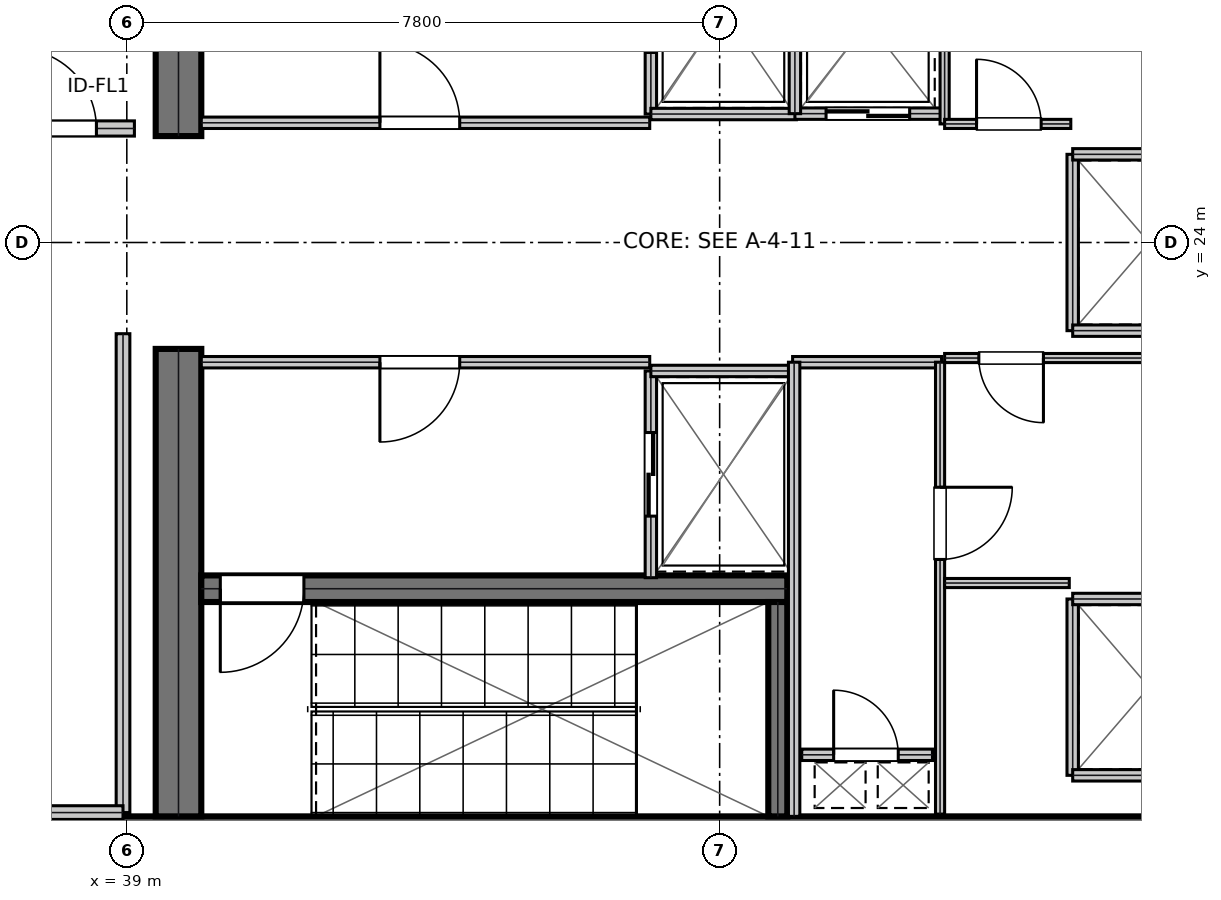
"""IFC4 building model, lengths in metres.
Left out: names, types, materials, properties, quantities, classifications, styles, units other than length and angle.
Written with IfcOpenShell. Run it as: python <this file> out.ifc"""

import sys

from ifc_helpers import new_model, si_unit, direction, frame, frame_2d, origin, place, context, subcontext, project, spatial, rectangle, extrude, element, fill, save


model = new_model("IFC4")
c1 = context("Model", 3, precision=1e-05, world=origin(), true_north=direction((0.0, 1.0)))
c2 = subcontext(c1, "Body", "Model", "MODEL_VIEW")
j1 = project(units=[si_unit("LENGTHUNIT", "METRE"), si_unit("PLANEANGLEUNIT", "RADIAN")], contexts=[c1])
p1 = place(None, origin())
s1 = spatial("IfcSite", under=j1, at=p1, CompositionType="ELEMENT")
p2 = place(p1, origin())
s2 = spatial("IfcBuilding", under=s1, at=p2, CompositionType="ELEMENT")
p3 = place(p2, frame((0.0, 0.0, 256.65)))
s3 = spatial("IfcBuildingStorey", under=s2, at=p3, CompositionType="ELEMENT", Elevation=256.65)
p4 = place(p3, frame((38.8, 16.15, 0.0), z_axis=(0.0, 0.0, 1.0), x_axis=(1.0, 0.0, 0.0)))
e1 = element("IfcWall", 1, at=p4, inside=s3, PredefinedType="SHEAR", context=c2, shape_type="SweptSolid", body=[
    extrude(rectangle(XDim=16.0, YDim=0.6, at=frame_2d((8.0, 0.0))), origin(), (0.0, 0.0, 1.0), 5.12),
])
p5 = place(p3, frame((39.68, 16.45, 0.0), z_axis=(0.0, 0.0, 1.0), x_axis=(0.0, 1.0, 0.0)))
e2 = element("IfcWall", 2, at=p5, inside=s3, PredefinedType="SHEAR", context=c2, shape_type="SweptSolid", body=[
    extrude(rectangle(XDim=6.15, YDim=0.6, at=frame_2d((3.075, 0.0))), origin(), (0.0, 0.0, 1.0), 5.12),
])
p6 = place(p3, frame((39.68, 25.4, 0.0), z_axis=(0.0, 0.0, 1.0), x_axis=(0.0, 1.0, 0.0)))
e3 = element("IfcWall", 3, at=p6, inside=s3, PredefinedType="SHEAR", context=c2, shape_type="SweptSolid", body=[
    extrude(rectangle(XDim=6.15, YDim=0.6, at=frame_2d((3.075, 0.0))), origin(), (0.0, 0.0, 1.0), 5.12),
])
p7 = place(p6, frame((1.35, 0.0, 0.0)))
e4 = element("IfcOpeningElement", 4, at=p7, cuts=e3, PredefinedType="OPENING", context=c2, shape_type="SweptSolid", body=[
    extrude(rectangle(XDim=1.05, YDim=2.15, at=frame_2d((0.525, 1.075))), frame((0.0, 0.31, 0.0), z_axis=(0.0, -1.0, 0.0), x_axis=(1.0, 0.0, 0.0)), (0.0, 0.0, 1.0), 0.62),
])
p8 = place(p3, frame((39.98, 19.445, 0.0), z_axis=(0.0, 0.0, 1.0), x_axis=(1.0, 0.0, 0.0)))
e5 = element("IfcWall", 5, at=p8, inside=s3, PredefinedType="SHEAR", context=c2, shape_type="SweptSolid", body=[
    extrude(rectangle(XDim=7.71, YDim=0.35, at=frame_2d((3.855, 0.0))), origin(), (0.0, 0.0, 1.0), 5.12),
])
p9 = place(p8, frame((0.25, 0.0, 0.0)))
e6 = element("IfcOpeningElement", 6, at=p9, cuts=e5, PredefinedType="OPENING", context=c2, shape_type="SweptSolid", body=[
    extrude(rectangle(XDim=1.1, YDim=2.15, at=frame_2d((0.55, 1.075))), frame((0.0, 0.185, 0.0), z_axis=(0.0, -1.0, 0.0), x_axis=(1.0, 0.0, 0.0)), (0.0, 0.0, 1.0), 0.37),
])
p10 = place(p3, frame((47.565, 16.45, 0.0), z_axis=(0.0, 0.0, 1.0), x_axis=(0.0, 1.0, 0.0)))
e7 = element("IfcWall", 7, at=p10, inside=s3, PredefinedType="SHEAR", context=c2, shape_type="SweptSolid", body=[
    extrude(rectangle(XDim=2.82, YDim=0.25, at=frame_2d((1.41, 0.0))), origin(), (0.0, 0.0, 1.0), 5.12),
])
p11 = place(p3, frame((39.98, 25.575, 0.0), z_axis=(0.0, 0.0, 1.0), x_axis=(1.0, 0.0, 0.0)))
e8 = element("IfcWall", 8, at=p11, inside=s3, PredefinedType="PARTITIONING", context=c2, shape_type="SweptSolid", body=[
    extrude(rectangle(XDim=5.9, YDim=0.15, at=frame_2d((2.95, 0.0))), origin(), (0.0, 0.0, 1.0), 5.12),
])
p12 = place(p11, frame((2.35, 0.0, 0.0)))
e9 = element("IfcOpeningElement", 9, at=p12, cuts=e8, PredefinedType="OPENING", context=c2, shape_type="SweptSolid", body=[
    extrude(rectangle(XDim=1.05, YDim=2.15, at=frame_2d((0.525, 1.075))), frame((0.0, 0.085, 0.0), z_axis=(0.0, -1.0, 0.0), x_axis=(1.0, 0.0, 0.0)), (0.0, 0.0, 1.0), 0.17),
])
p13 = place(p3, frame((39.98, 22.425, 0.0), z_axis=(0.0, 0.0, 1.0), x_axis=(1.0, 0.0, 0.0)))
e10 = element("IfcWall", 10, at=p13, inside=s3, PredefinedType="PARTITIONING", context=c2, shape_type="SweptSolid", body=[
    extrude(rectangle(XDim=5.9, YDim=0.15, at=frame_2d((2.95, 0.0))), origin(), (0.0, 0.0, 1.0), 5.12),
])
p14 = place(p13, frame((2.35, 0.0, 0.0)))
e11 = element("IfcOpeningElement", 11, at=p14, cuts=e10, PredefinedType="OPENING", context=c2, shape_type="SweptSolid", body=[
    extrude(rectangle(XDim=1.05, YDim=2.15, at=frame_2d((0.525, 1.075))), frame((0.0, 0.085, 0.0), z_axis=(0.0, -1.0, 0.0), x_axis=(1.0, 0.0, 0.0)), (0.0, 0.0, 1.0), 0.17),
])
p15 = place(p3, frame((45.895, 25.69, 0.0), z_axis=(0.0, 0.0, 1.0), x_axis=(0.0, 1.0, 0.0)))
e12 = element("IfcWall", 12, at=p15, inside=s3, PredefinedType="PARTITIONING", context=c2, shape_type="SweptSolid", body=[
    extrude(rectangle(XDim=2.72, YDim=0.15, at=frame_2d((1.36, 0.0))), origin(), (0.0, 0.0, 1.0), 5.12),
])
p16 = place(p15, frame((0.81, 0.0, 0.0)))
e13 = element("IfcOpeningElement", 13, at=p16, cuts=e12, PredefinedType="OPENING", context=c2, shape_type="SweptSolid", body=[
    extrude(rectangle(XDim=1.1, YDim=2.15, at=frame_2d((0.55, 1.075))), frame((0.0, 0.085, 0.0), z_axis=(0.0, -1.0, 0.0), x_axis=(1.0, 0.0, 0.0)), (0.0, 0.0, 1.0), 0.17),
])
p17 = place(p3, frame((45.895, 25.69, 0.0), z_axis=(0.0, 0.0, 1.0), x_axis=(1.0, 0.0, 0.0)))
e14 = element("IfcWall", 14, at=p17, inside=s3, PredefinedType="PARTITIONING", context=c2, shape_type="SweptSolid", body=[
    extrude(rectangle(XDim=1.915, YDim=0.15, at=frame_2d((0.958, 0.0))), origin(), (0.0, 0.0, 1.0), 5.12),
])
p18 = place(p3, frame((45.895, 19.59, 0.0), z_axis=(0.0, 0.0, 1.0), x_axis=(0.0, 1.0, 0.0)))
e15 = element("IfcWall", 15, at=p18, inside=s3, PredefinedType="PARTITIONING", context=c2, shape_type="SweptSolid", body=[
    extrude(rectangle(XDim=2.72, YDim=0.15, at=frame_2d((1.36, 0.0))), origin(), (0.0, 0.0, 1.0), 5.12),
])
p19 = place(p18, frame((0.81, 0.0, 0.0)))
e16 = element("IfcOpeningElement", 16, at=p19, cuts=e15, PredefinedType="OPENING", context=c2, shape_type="SweptSolid", body=[
    extrude(rectangle(XDim=1.1, YDim=2.15, at=frame_2d((0.55, 1.075))), frame((0.0, 0.085, 0.0), z_axis=(0.0, -1.0, 0.0), x_axis=(1.0, 0.0, 0.0)), (0.0, 0.0, 1.0), 0.17),
])
p20 = place(p3, frame((45.895, 22.31, 0.0), z_axis=(0.0, 0.0, 1.0), x_axis=(1.0, 0.0, 0.0)))
e17 = element("IfcWall", 17, at=p20, inside=s3, PredefinedType="PARTITIONING", context=c2, shape_type="SweptSolid", body=[
    extrude(rectangle(XDim=1.915, YDim=0.15, at=frame_2d((0.958, 0.0))), origin(), (0.0, 0.0, 1.0), 5.12),
])
p21 = place(p3, frame((47.79, 25.695, 0.0), z_axis=(0.0, 0.0, 1.0), x_axis=(1.0, 0.0, 0.0)))
e18 = element("IfcWall", 18, at=p21, inside=s3, PredefinedType="PARTITIONING", context=c2, shape_type="SweptSolid", body=[
    extrude(rectangle(XDim=1.92, YDim=0.15, at=frame_2d((0.96, 0.0))), origin(), (0.0, 0.0, 1.0), 5.12),
])
p22 = place(p21, frame((0.41, 0.0, 0.0)))
e19 = element("IfcOpeningElement", 19, at=p22, cuts=e18, PredefinedType="OPENING", context=c2, shape_type="SweptSolid", body=[
    extrude(rectangle(XDim=1.1, YDim=2.15, at=frame_2d((0.55, 1.075))), frame((0.0, 0.085, 0.0), z_axis=(0.0, -1.0, 0.0), x_axis=(1.0, 0.0, 0.0)), (0.0, 0.0, 1.0), 0.17),
])
p23 = place(p3, frame((47.79, 25.695, 0.0), z_axis=(0.0, 0.0, 1.0), x_axis=(0.0, 1.0, 0.0)))
e20 = element("IfcWall", 20, at=p23, inside=s3, PredefinedType="PARTITIONING", context=c2, shape_type="SweptSolid", body=[
    extrude(rectangle(XDim=2.415, YDim=0.15, at=frame_2d((1.208, 0.0))), origin(), (0.0, 0.0, 1.0), 5.12),
])
p24 = place(p3, frame((51.445, 22.84, 0.0), z_axis=(0.0, 0.0, 1.0), x_axis=(0.0, 1.0, 0.0)))
e21 = element("IfcWall", 21, at=p24, inside=s3, PredefinedType="PARTITIONING", context=c2, shape_type="SweptSolid", body=[
    extrude(rectangle(XDim=2.32, YDim=0.15, at=frame_2d((1.16, 0.0))), origin(), (0.0, 0.0, 1.0), 5.12),
])
for number, where, z_axis, x_axis in (
    (22, (51.445, 22.84, 0.0), (0.0, 0.0, 1.0), (1.0, 0.0, 0.0)),
    (23, (51.445, 25.16, 0.0), (0.0, 0.0, 1.0), (1.0, 0.0, 0.0)),
):
    element("IfcWall", number, at=place(p3, frame(where, z_axis=z_axis, x_axis=x_axis)), inside=s3, PredefinedType="PARTITIONING", context=c2, shape_type="SweptSolid", body=[
        extrude(rectangle(XDim=2.015, YDim=0.15, at=frame_2d((1.007, 0.0))), origin(), (0.0, 0.0, 1.0), 5.12),
    ])
p25 = place(p3, frame((51.445, 16.99, 0.0), z_axis=(0.0, 0.0, 1.0), x_axis=(0.0, 1.0, 0.0)))
e24 = element("IfcWall", 24, at=p25, inside=s3, PredefinedType="PARTITIONING", context=c2, shape_type="SweptSolid", body=[
    extrude(rectangle(XDim=2.32, YDim=0.15, at=frame_2d((1.16, 0.0))), origin(), (0.0, 0.0, 1.0), 5.12),
])
for number, where, z_axis, x_axis in (
    (25, (51.445, 16.99, 0.0), (0.0, 0.0, 1.0), (1.0, 0.0, 0.0)),
    (26, (51.445, 19.31, 0.0), (0.0, 0.0, 1.0), (1.0, 0.0, 0.0)),
):
    element("IfcWall", number, at=place(p3, frame(where, z_axis=z_axis, x_axis=x_axis)), inside=s3, PredefinedType="PARTITIONING", context=c2, shape_type="SweptSolid", body=[
        extrude(rectangle(XDim=2.015, YDim=0.15, at=frame_2d((1.007, 0.0))), origin(), (0.0, 0.0, 1.0), 5.12),
    ])
p26 = place(p3, frame((47.88, 17.26, 0.0), z_axis=(0.0, 0.0, 1.0), x_axis=(1.0, 0.0, 0.0)))
e27 = element("IfcWall", 27, at=p26, inside=s3, PredefinedType="PARTITIONING", context=c2, shape_type="SweptSolid", body=[
    extrude(rectangle(XDim=1.72, YDim=0.15, at=frame_2d((0.86, 0.0))), origin(), (0.0, 0.0, 1.0), 5.12),
])
p27 = place(p26, frame((0.42, 0.0, 0.0)))
e28 = element("IfcOpeningElement", 28, at=p27, cuts=e27, PredefinedType="OPENING", context=c2, shape_type="SweptSolid", body=[
    extrude(rectangle(XDim=0.85, YDim=2.15, at=frame_2d((0.425, 1.075))), frame((0.0, 0.085, 0.0), z_axis=(0.0, -1.0, 0.0), x_axis=(1.0, 0.0, 0.0)), (0.0, 0.0, 1.0), 0.17),
])
p28 = place(p3, frame((47.76, 22.425, 0.0), z_axis=(0.0, 0.0, 1.0), x_axis=(1.0, 0.0, 0.0)))
e29 = element("IfcWall", 29, at=p28, inside=s3, PredefinedType="PARTITIONING", context=c2, shape_type="SweptSolid", body=[
    extrude(rectangle(XDim=1.96, YDim=0.15, at=frame_2d((0.98, 0.0))), origin(), (0.0, 0.0, 1.0), 5.12),
])
p29 = place(p3, frame((47.78, 16.45, 0.0), z_axis=(0.0, 0.0, 1.0), x_axis=(0.0, 1.0, 0.0)))
e30 = element("IfcWall", 30, at=p29, inside=s3, PredefinedType="PARTITIONING", context=c2, shape_type="SweptSolid", body=[
    extrude(rectangle(XDim=5.975, YDim=0.15, at=frame_2d((2.988, 0.0))), origin(), (0.0, 0.0, 1.0), 5.12),
])
p30 = place(p3, frame((49.7, 16.48, 0.0), z_axis=(0.0, 0.0, 1.0), x_axis=(0.0, 1.0, 0.0)))
e31 = element("IfcWall", 31, at=p30, inside=s3, PredefinedType="PARTITIONING", context=c2, shape_type="SweptSolid", body=[
    extrude(rectangle(XDim=5.945, YDim=0.12, at=frame_2d((2.973, 0.0))), origin(), (0.0, 0.0, 1.0), 5.12),
])
p31 = place(p30, frame((3.35, 0.0, 0.0)))
e32 = element("IfcOpeningElement", 32, at=p31, cuts=e31, PredefinedType="OPENING", context=c2, shape_type="SweptSolid", body=[
    extrude(rectangle(XDim=0.95, YDim=2.15, at=frame_2d((0.475, 1.075))), frame((0.0, 0.07, 0.0), z_axis=(0.0, -1.0, 0.0), x_axis=(1.0, 0.0, 0.0)), (0.0, 0.0, 1.0), 0.14),
])
p32 = place(p3, frame((49.76, 22.48, 0.0), z_axis=(0.0, 0.0, 1.0), x_axis=(1.0, 0.0, 0.0)))
e33 = element("IfcWall", 33, at=p32, inside=s3, PredefinedType="PARTITIONING", context=c2, shape_type="SweptSolid", body=[
    extrude(rectangle(XDim=3.9, YDim=0.12, at=frame_2d((1.95, 0.0))), origin(), (0.0, 0.0, 1.0), 5.12),
])
p33 = place(p32, frame((0.45, 0.0, 0.0)))
e34 = element("IfcOpeningElement", 34, at=p33, cuts=e33, PredefinedType="OPENING", context=c2, shape_type="SweptSolid", body=[
    extrude(rectangle(XDim=0.85, YDim=2.15, at=frame_2d((0.425, 1.075))), frame((0.0, 0.07, 0.0), z_axis=(0.0, -1.0, 0.0), x_axis=(1.0, 0.0, 0.0)), (0.0, 0.0, 1.0), 0.14),
])
p34 = place(p3, frame((49.76, 19.52, 0.0), z_axis=(0.0, 0.0, 1.0), x_axis=(1.0, 0.0, 0.0)))
e35 = element("IfcWall", 35, at=p34, inside=s3, PredefinedType="PARTITIONING", context=c2, shape_type="SweptSolid", body=[
    extrude(rectangle(XDim=1.64, YDim=0.12, at=frame_2d((0.82, 0.0))), origin(), (0.0, 0.0, 1.0), 5.12),
])
p35 = place(p3, frame((49.76, 25.56, 0.0), z_axis=(0.0, 0.0, 1.0), x_axis=(0.0, 1.0, 0.0)))
e36 = element("IfcWall", 36, at=p35, inside=s3, PredefinedType="PARTITIONING", context=c2, shape_type="SweptSolid", body=[
    extrude(rectangle(XDim=2.66, YDim=0.12, at=frame_2d((1.33, 0.0))), origin(), (0.0, 0.0, 1.0), 5.12),
])
p36 = place(p3, frame((49.76, 25.56, 0.0), z_axis=(0.0, 0.0, 1.0), x_axis=(1.0, 0.0, 0.0)))
e37 = element("IfcWall", 37, at=p36, inside=s3, PredefinedType="PARTITIONING", context=c2, shape_type="SweptSolid", body=[
    extrude(rectangle(XDim=1.66, YDim=0.12, at=frame_2d((0.83, 0.0))), origin(), (0.0, 0.0, 1.0), 5.12),
])
p37 = place(p36, frame((0.42, 0.0, 0.0)))
e38 = element("IfcOpeningElement", 38, at=p37, cuts=e37, PredefinedType="OPENING", context=c2, shape_type="SweptSolid", body=[
    extrude(rectangle(XDim=0.85, YDim=2.15, at=frame_2d((0.425, 1.075))), frame((0.0, 0.07, 0.0), z_axis=(0.0, -1.0, 0.0), x_axis=(1.0, 0.0, 0.0)), (0.0, 0.0, 1.0), 0.14),
])
p38 = place(p3, frame((19.75, 25.5, 0.0), z_axis=(0.0, 0.0, 1.0), x_axis=(1.0, 0.0, 0.0)))
e39 = element("IfcWall", 39, at=p38, inside=s3, PredefinedType="SOLIDWALL", context=c2, shape_type="SweptSolid", body=[
    extrude(rectangle(XDim=19.35, YDim=0.2, at=frame_2d((9.675, 0.0))), origin(), (0.0, 0.0, 1.0), 4.58),
])
p39 = place(p38, frame((17.8, 0.0, 0.0)))
e40 = element("IfcOpeningElement", 40, at=p39, cuts=e39, PredefinedType="OPENING", context=c2, shape_type="SweptSolid", body=[
    extrude(rectangle(XDim=1.05, YDim=2.15, at=frame_2d((0.525, 1.075))), frame((0.0, 0.11, 0.0), z_axis=(0.0, -1.0, 0.0), x_axis=(1.0, 0.0, 0.0)), (0.0, 0.0, 1.0), 0.22),
])
p40 = place(p3, frame((38.95, 16.5, 0.0), z_axis=(0.0, 0.0, 1.0), x_axis=(0.0, 1.0, 0.0)))
e41 = element("IfcWall", 41, at=p40, inside=s3, PredefinedType="SOLIDWALL", context=c2, shape_type="SweptSolid", body=[
    extrude(rectangle(XDim=6.3, YDim=0.18, at=frame_2d((3.15, 0.0))), origin(), (0.0, 0.0, 1.0), 4.85),
])
p41 = place(p3, frame((37.05, 16.5, 0.0), z_axis=(0.0, 0.0, 1.0), x_axis=(1.0, 0.0, 0.0)))
e42 = element("IfcWall", 42, at=p41, inside=s3, PredefinedType="SOLIDWALL", context=c2, shape_type="SweptSolid", body=[
    extrude(rectangle(XDim=1.9, YDim=0.18, at=frame_2d((0.95, 0.0))), origin(), (0.0, 0.0, 1.0), 5.12),
])
p42 = place(p12, origin())
e43 = element("IfcDoor", 43, at=p42, inside=s3, OperationType="SINGLE_SWING_LEFT", PredefinedType="DOOR", context=c2, shape_type="SweptSolid", body=[
    extrude(rectangle(XDim=1.05, YDim=2.15, at=frame_2d((0.525, 1.075))), frame((0.0, 0.025, 0.0), z_axis=(0.0, -1.0, 0.0), x_axis=(1.0, 0.0, 0.0)), (0.0, 0.0, 1.0), 0.05),
])
fill(e9, e43)
p43 = place(p14, frame((1.05, 0.0, 0.0), z_axis=(0.0, 0.0, 1.0), x_axis=(-1.0, 0.0, 0.0)))
e44 = element("IfcDoor", 44, at=p43, inside=s3, OperationType="SINGLE_SWING_RIGHT", PredefinedType="DOOR", context=c2, shape_type="SweptSolid", body=[
    extrude(rectangle(XDim=1.05, YDim=2.15, at=frame_2d((0.525, 1.075))), frame((0.0, 0.025, 0.0), z_axis=(0.0, -1.0, 0.0), x_axis=(1.0, 0.0, 0.0)), (0.0, 0.0, 1.0), 0.05),
])
fill(e11, e44)
p44 = place(p19, frame((1.1, 0.0, 0.0), z_axis=(0.0, 0.0, 1.0), x_axis=(-1.0, 0.0, 0.0)))
e45 = element("IfcDoor", 45, at=p44, inside=s3, OperationType="DOUBLE_DOOR_SLIDING", PredefinedType="DOOR", context=c2, shape_type="SweptSolid", body=[
    extrude(rectangle(XDim=1.1, YDim=2.15, at=frame_2d((0.55, 1.075))), frame((0.0, 0.025, 0.0), z_axis=(0.0, -1.0, 0.0), x_axis=(1.0, 0.0, 0.0)), (0.0, 0.0, 1.0), 0.05),
])
fill(e16, e45)
p45 = place(p22, frame((1.1, 0.0, 0.0), z_axis=(0.0, 0.0, 1.0), x_axis=(-1.0, 0.0, 0.0)))
e46 = element("IfcDoor", 46, at=p45, inside=s3, OperationType="DOUBLE_DOOR_SLIDING", PredefinedType="DOOR", context=c2, shape_type="SweptSolid", body=[
    extrude(rectangle(XDim=1.1, YDim=2.15, at=frame_2d((0.55, 1.075))), frame((0.0, 0.025, 0.0), z_axis=(0.0, -1.0, 0.0), x_axis=(1.0, 0.0, 0.0)), (0.0, 0.0, 1.0), 0.05),
])
fill(e19, e46)
p46 = place(p27, origin())
e47 = element("IfcDoor", 47, at=p46, inside=s3, OperationType="SINGLE_SWING_LEFT", PredefinedType="TRAPDOOR", context=c2, shape_type="SweptSolid", body=[
    extrude(rectangle(XDim=0.85, YDim=2.15, at=frame_2d((0.425, 1.075))), frame((0.0, 0.025, 0.0), z_axis=(0.0, -1.0, 0.0), x_axis=(1.0, 0.0, 0.0)), (0.0, 0.0, 1.0), 0.05),
])
fill(e28, e47)
p47 = place(p31, frame((0.95, 0.0, 0.0), z_axis=(0.0, 0.0, 1.0), x_axis=(-1.0, 0.0, 0.0)))
e48 = element("IfcDoor", 48, at=p47, inside=s3, OperationType="SINGLE_SWING_LEFT", PredefinedType="DOOR", context=c2, shape_type="SweptSolid", body=[
    extrude(rectangle(XDim=0.95, YDim=2.15, at=frame_2d((0.475, 1.075))), frame((0.0, 0.025, 0.0), z_axis=(0.0, -1.0, 0.0), x_axis=(1.0, 0.0, 0.0)), (0.0, 0.0, 1.0), 0.05),
])
fill(e32, e48)
p48 = place(p33, frame((0.85, 0.0, 0.0), z_axis=(0.0, 0.0, 1.0), x_axis=(-1.0, 0.0, 0.0)))
e49 = element("IfcDoor", 49, at=p48, inside=s3, OperationType="SINGLE_SWING_LEFT", PredefinedType="DOOR", context=c2, shape_type="SweptSolid", body=[
    extrude(rectangle(XDim=0.85, YDim=2.15, at=frame_2d((0.425, 1.075))), frame((0.0, 0.025, 0.0), z_axis=(0.0, -1.0, 0.0), x_axis=(1.0, 0.0, 0.0)), (0.0, 0.0, 1.0), 0.05),
])
fill(e34, e49)
p49 = place(p37, origin())
e50 = element("IfcDoor", 50, at=p49, inside=s3, OperationType="SINGLE_SWING_LEFT", PredefinedType="DOOR", context=c2, shape_type="SweptSolid", body=[
    extrude(rectangle(XDim=0.85, YDim=2.15, at=frame_2d((0.425, 1.075))), frame((0.0, 0.025, 0.0), z_axis=(0.0, -1.0, 0.0), x_axis=(1.0, 0.0, 0.0)), (0.0, 0.0, 1.0), 0.05),
])
fill(e38, e50)
p50 = place(p39, origin())
e51 = element("IfcDoor", 51, at=p50, inside=s3, OperationType="SINGLE_SWING_LEFT", PredefinedType="DOOR", context=c2, shape_type="SweptSolid", body=[
    extrude(rectangle(XDim=1.05, YDim=2.15, at=frame_2d((0.525, 1.075))), frame((0.0, 0.025, 0.0), z_axis=(0.0, -1.0, 0.0), x_axis=(1.0, 0.0, 0.0)), (0.0, 0.0, 1.0), 0.05),
])
fill(e40, e51)
p51 = place(p9, frame((1.1, 0.0, 0.0), z_axis=(0.0, 0.0, 1.0), x_axis=(-1.0, 0.0, 0.0)))
e52 = element("IfcDoor", 52, at=p51, inside=s3, OperationType="SINGLE_SWING_RIGHT", PredefinedType="DOOR", context=c2, shape_type="SweptSolid", body=[
    extrude(rectangle(XDim=1.1, YDim=2.15, at=frame_2d((0.55, 1.075))), frame((0.0, 0.025, 0.0), z_axis=(0.0, -1.0, 0.0), x_axis=(1.0, 0.0, 0.0)), (0.0, 0.0, 1.0), 0.05),
])
fill(e6, e52)
save(model, sys.argv[1])
